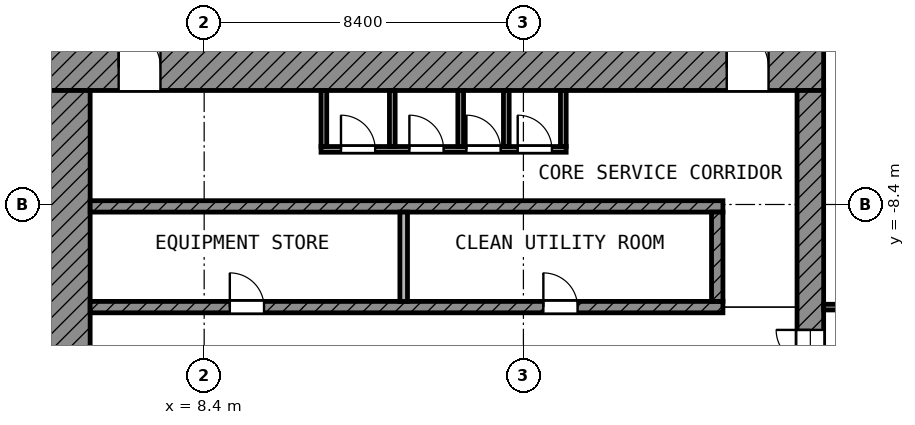
"""IFC4 building model, lengths in metres.
Left out: names, types, materials, properties, quantities, classifications, styles, units other than length and angle.
Written with IfcOpenShell. Run it as: python <this file> out.ifc"""

import sys

from ifc_helpers import new_model, si_unit, direction, frame, frame_2d, origin, place, context, subcontext, project, spatial, rectangle, extrude, element, fill, save


model = new_model("IFC4")
c1 = context("Model", 3, precision=1e-05, world=origin(), true_north=direction((0.0, 1.0)))
c2 = subcontext(c1, "Body", "Model", "MODEL_VIEW")
j1 = project(units=[si_unit("LENGTHUNIT", "METRE"), si_unit("PLANEANGLEUNIT", "RADIAN")], contexts=[c1])
p1 = place(None, origin())
s1 = spatial("IfcSite", under=j1, at=p1, CompositionType="ELEMENT")
p2 = place(p1, origin())
s2 = spatial("IfcBuilding", under=s1, at=p2, CompositionType="ELEMENT")
p3 = place(p2, frame((0.0, 0.0, 286.0)))
s3 = spatial("IfcBuildingStorey", under=s2, at=p3, CompositionType="ELEMENT", Elevation=286.0)
p4 = place(p3, frame((4.2, -4.8, 0.0), z_axis=(0.0, 0.0, 1.0), x_axis=(1.0, 0.0, 0.0)))
e1 = element("IfcWall", 1, at=p4, inside=s3, PredefinedType="SHEAR", context=c2, shape_type="SweptSolid", body=[
    extrude(rectangle(XDim=20.5, YDim=1.2, at=frame_2d((10.25, 0.0))), origin(), (0.0, 0.0, 1.0), 3.6),
])
p5 = place(p4, frame((1.95, 0.0, 0.0)))
e2 = element("IfcOpeningElement", 2, at=p5, cuts=e1, PredefinedType="OPENING", context=c2, shape_type="SweptSolid", body=[
    extrude(rectangle(XDim=1.1, YDim=2.1, at=frame_2d((0.55, 1.05))), frame((0.0, 0.61, 0.0), z_axis=(0.0, -1.0, 0.0), x_axis=(1.0, 0.0, 0.0)), (0.0, 0.0, 1.0), 1.22),
])
p6 = place(p4, frame((17.95, 0.0, 0.0)))
e3 = element("IfcOpeningElement", 3, at=p6, cuts=e1, PredefinedType="OPENING", context=c2, shape_type="SweptSolid", body=[
    extrude(rectangle(XDim=1.1, YDim=2.1, at=frame_2d((0.55, 1.05))), frame((0.0, 0.61, 0.0), z_axis=(0.0, -1.0, 0.0), x_axis=(1.0, 0.0, 0.0)), (0.0, 0.0, 1.0), 1.22),
])
p7 = place(p3, frame((4.8, -24.7, 0.0), z_axis=(0.0, 0.0, 1.0), x_axis=(0.0, 1.0, 0.0)))
e4 = element("IfcWall", 4, at=p7, inside=s3, PredefinedType="SHEAR", context=c2, shape_type="SweptSolid", body=[
    extrude(rectangle(XDim=19.3, YDim=1.2, at=frame_2d((9.65, 0.0))), origin(), (0.0, 0.0, 1.0), 3.6),
])
p8 = place(p7, frame((11.15, 0.0, 0.0)))
e5 = element("IfcOpeningElement", 5, at=p8, cuts=e4, PredefinedType="OPENING", context=c2, shape_type="SweptSolid", body=[
    extrude(rectangle(XDim=1.1, YDim=2.1, at=frame_2d((0.55, 1.05))), frame((0.0, 0.61, 0.0), z_axis=(0.0, -1.0, 0.0), x_axis=(1.0, 0.0, 0.0)), (0.0, 0.0, 1.0), 1.22),
])
p9 = place(p7, frame((1.85, 0.0, 0.0)))
e6 = element("IfcOpeningElement", 6, at=p9, cuts=e4, PredefinedType="OPENING", context=c2, shape_type="SweptSolid", body=[
    extrude(rectangle(XDim=1.1, YDim=2.1, at=frame_2d((0.55, 1.05))), frame((0.0, 0.61, 0.0), z_axis=(0.0, -1.0, 0.0), x_axis=(1.0, 0.0, 0.0)), (0.0, 0.0, 1.0), 1.22),
])
p10 = place(p3, frame((24.35, -24.0, 0.0), z_axis=(0.0, 0.0, 1.0), x_axis=(0.0, 1.0, 0.0)))
e7 = element("IfcWall", 7, at=p10, inside=s3, PredefinedType="SHEAR", context=c2, shape_type="SweptSolid", body=[
    extrude(rectangle(XDim=18.6, YDim=0.7, at=frame_2d((9.3, 0.0))), origin(), (0.0, 0.0, 1.0), 3.6),
])
p11 = place(p10, frame((10.5, 0.0, 0.0)))
e8 = element("IfcOpeningElement", 8, at=p11, cuts=e7, PredefinedType="OPENING", context=c2, shape_type="SweptSolid", body=[
    extrude(rectangle(XDim=1.8, YDim=2.1, at=frame_2d((0.9, 1.05))), frame((0.0, 0.36, 0.0), z_axis=(0.0, -1.0, 0.0), x_axis=(1.0, 0.0, 0.0)), (0.0, 0.0, 1.0), 0.72),
])
p12 = place(p3, frame((5.4, -8.45, 0.0), z_axis=(0.0, 0.0, 1.0), x_axis=(1.0, 0.0, 0.0)))
e9 = element("IfcWall", 9, at=p12, inside=s3, PredefinedType="SHEAR", context=c2, shape_type="SweptSolid", body=[
    extrude(rectangle(XDim=16.65, YDim=0.3, at=frame_2d((8.325, 0.0))), origin(), (0.0, 0.0, 1.0), 3.6),
])
p13 = place(p3, frame((5.4, -11.1, 0.0), z_axis=(0.0, 0.0, 1.0), x_axis=(1.0, 0.0, 0.0)))
e10 = element("IfcWall", 10, at=p13, inside=s3, PredefinedType="SHEAR", context=c2, shape_type="SweptSolid", body=[
    extrude(rectangle(XDim=16.65, YDim=0.3, at=frame_2d((8.325, 0.0))), origin(), (0.0, 0.0, 1.0), 3.6),
])
p14 = place(p13, frame((3.675, 0.0, 0.0)))
e11 = element("IfcOpeningElement", 11, at=p14, cuts=e10, PredefinedType="OPENING", context=c2, shape_type="SweptSolid", body=[
    extrude(rectangle(XDim=0.9, YDim=2.1, at=frame_2d((0.45, 1.05))), frame((0.0, 0.16, 0.0), z_axis=(0.0, -1.0, 0.0), x_axis=(1.0, 0.0, 0.0)), (0.0, 0.0, 1.0), 0.32),
])
p15 = place(p13, frame((11.925, 0.0, 0.0)))
e12 = element("IfcOpeningElement", 12, at=p15, cuts=e10, PredefinedType="OPENING", context=c2, shape_type="SweptSolid", body=[
    extrude(rectangle(XDim=0.9, YDim=2.1, at=frame_2d((0.45, 1.05))), frame((0.0, 0.16, 0.0), z_axis=(0.0, -1.0, 0.0), x_axis=(1.0, 0.0, 0.0)), (0.0, 0.0, 1.0), 0.32),
])
p16 = place(p3, frame((21.9, -10.95, 0.0), z_axis=(0.0, 0.0, 1.0), x_axis=(0.0, 1.0, 0.0)))
e13 = element("IfcWall", 13, at=p16, inside=s3, PredefinedType="SHEAR", context=c2, shape_type="SweptSolid", body=[
    extrude(rectangle(XDim=2.35, YDim=0.3, at=frame_2d((1.175, 0.0))), origin(), (0.0, 0.0, 1.0), 3.6),
])
p17 = place(p3, frame((13.65, -10.95, 0.0), z_axis=(0.0, 0.0, 1.0), x_axis=(0.0, 1.0, 0.0)))
e14 = element("IfcWall", 14, at=p17, inside=s3, PredefinedType="PARTITIONING", context=c2, shape_type="SweptSolid", body=[
    extrude(rectangle(XDim=2.35, YDim=0.2, at=frame_2d((1.175, 0.0))), origin(), (0.0, 0.0, 1.0), 3.6),
])
p18 = place(p3, frame((11.475, -6.95, 0.0), z_axis=(0.0, 0.0, 1.0), x_axis=(1.0, 0.0, 0.0)))
e15 = element("IfcWall", 15, at=p18, inside=s3, PredefinedType="PARTITIONING", context=c2, shape_type="SweptSolid", body=[
    extrude(rectangle(XDim=6.45, YDim=0.15, at=frame_2d((3.225, 0.0))), origin(), (0.0, 0.0, 1.0), 3.6),
])
p19 = place(p18, frame((0.525, 0.0, 0.0)))
e16 = element("IfcOpeningElement", 16, at=p19, cuts=e15, PredefinedType="OPENING", context=c2, shape_type="SweptSolid", body=[
    extrude(rectangle(XDim=0.9, YDim=2.1, at=frame_2d((0.45, 1.05))), frame((0.0, 0.085, 0.0), z_axis=(0.0, -1.0, 0.0), x_axis=(1.0, 0.0, 0.0)), (0.0, 0.0, 1.0), 0.17),
])
p20 = place(p18, frame((2.325, 0.0, 0.0)))
e17 = element("IfcOpeningElement", 17, at=p20, cuts=e15, PredefinedType="OPENING", context=c2, shape_type="SweptSolid", body=[
    extrude(rectangle(XDim=0.9, YDim=2.1, at=frame_2d((0.45, 1.05))), frame((0.0, 0.085, 0.0), z_axis=(0.0, -1.0, 0.0), x_axis=(1.0, 0.0, 0.0)), (0.0, 0.0, 1.0), 0.17),
])
p21 = place(p18, frame((3.825, 0.0, 0.0)))
e18 = element("IfcOpeningElement", 18, at=p21, cuts=e15, PredefinedType="OPENING", context=c2, shape_type="SweptSolid", body=[
    extrude(rectangle(XDim=0.9, YDim=2.1, at=frame_2d((0.45, 1.05))), frame((0.0, 0.085, 0.0), z_axis=(0.0, -1.0, 0.0), x_axis=(1.0, 0.0, 0.0)), (0.0, 0.0, 1.0), 0.17),
])
p22 = place(p18, frame((5.175, 0.0, 0.0)))
e19 = element("IfcOpeningElement", 19, at=p22, cuts=e15, PredefinedType="OPENING", context=c2, shape_type="SweptSolid", body=[
    extrude(rectangle(XDim=0.9, YDim=2.1, at=frame_2d((0.45, 1.05))), frame((0.0, 0.085, 0.0), z_axis=(0.0, -1.0, 0.0), x_axis=(1.0, 0.0, 0.0)), (0.0, 0.0, 1.0), 0.17),
])
for number, where, z_axis, x_axis in (
    (20, (11.55, -6.875, 0.0), (0.0, 0.0, 1.0), (0.0, 1.0, 0.0)),
    (21, (13.35, -6.875, 0.0), (0.0, 0.0, 1.0), (0.0, 1.0, 0.0)),
    (22, (15.15, -6.875, 0.0), (0.0, 0.0, 1.0), (0.0, 1.0, 0.0)),
    (23, (16.35, -6.875, 0.0), (0.0, 0.0, 1.0), (0.0, 1.0, 0.0)),
    (24, (17.85, -6.875, 0.0), (0.0, 0.0, 1.0), (0.0, 1.0, 0.0)),
):
    element("IfcWall", number, at=place(p3, frame(where, z_axis=z_axis, x_axis=x_axis)), inside=s3, PredefinedType="PARTITIONING", context=c2, shape_type="SweptSolid", body=[
        extrude(rectangle(XDim=1.475, YDim=0.15, at=frame_2d((0.738, 0.0))), origin(), (0.0, 0.0, 1.0), 3.6),
    ])
p23 = place(p3, frame((24.7, -11.1, 0.0), z_axis=(0.0, 0.0, 1.0), x_axis=(1.0, 0.0, 0.0)))
e25 = element("IfcWall", 25, at=p23, inside=s3, PredefinedType="PARTITIONING", context=c2, shape_type="SweptSolid", body=[
    extrude(rectangle(XDim=4.625, YDim=0.15, at=frame_2d((2.312, 0.0))), origin(), (0.0, 0.0, 1.0), 3.6),
])
p24 = place(p23, frame((1.1, 0.0, 0.0)))
e26 = element("IfcOpeningElement", 26, at=p24, cuts=e25, PredefinedType="OPENING", context=c2, shape_type="SweptSolid", body=[
    extrude(rectangle(XDim=0.9, YDim=2.1, at=frame_2d((0.45, 1.05))), frame((0.0, 0.085, 0.0), z_axis=(0.0, -1.0, 0.0), x_axis=(1.0, 0.0, 0.0)), (0.0, 0.0, 1.0), 0.17),
])
p25 = place(p23, frame((3.15, 0.0, 0.0)))
e27 = element("IfcOpeningElement", 27, at=p25, cuts=e25, PredefinedType="OPENING", context=c2, shape_type="SweptSolid", body=[
    extrude(rectangle(XDim=1.0, YDim=2.1, at=frame_2d((0.5, 1.05))), frame((0.0, 0.085, 0.0), z_axis=(0.0, -1.0, 0.0), x_axis=(1.0, 0.0, 0.0)), (0.0, 0.0, 1.0), 0.17),
])
p26 = place(p5, origin())
e28 = element("IfcDoor", 28, at=p26, inside=s3, OperationType="SINGLE_SWING_LEFT", PredefinedType="DOOR", context=c2, shape_type="SweptSolid", body=[
    extrude(rectangle(XDim=1.1, YDim=2.1, at=frame_2d((0.55, 1.05))), frame((0.0, 0.025, 0.0), z_axis=(0.0, -1.0, 0.0), x_axis=(1.0, 0.0, 0.0)), (0.0, 0.0, 1.0), 0.05),
])
fill(e2, e28)
p27 = place(p6, origin())
e29 = element("IfcDoor", 29, at=p27, inside=s3, OperationType="SINGLE_SWING_LEFT", PredefinedType="DOOR", context=c2, shape_type="SweptSolid", body=[
    extrude(rectangle(XDim=1.1, YDim=2.1, at=frame_2d((0.55, 1.05))), frame((0.0, 0.025, 0.0), z_axis=(0.0, -1.0, 0.0), x_axis=(1.0, 0.0, 0.0)), (0.0, 0.0, 1.0), 0.05),
])
fill(e3, e29)
p28 = place(p11, origin())
e30 = element("IfcDoor", 30, at=p28, inside=s3, OperationType="DOUBLE_DOOR_SINGLE_SWING", PredefinedType="DOOR", context=c2, shape_type="SweptSolid", body=[
    extrude(rectangle(XDim=1.8, YDim=2.1, at=frame_2d((0.9, 1.05))), frame((0.0, 0.025, 0.0), z_axis=(0.0, -1.0, 0.0), x_axis=(1.0, 0.0, 0.0)), (0.0, 0.0, 1.0), 0.05),
])
fill(e8, e30)
p29 = place(p19, origin())
e31 = element("IfcDoor", 31, at=p29, inside=s3, OperationType="SINGLE_SWING_LEFT", PredefinedType="DOOR", context=c2, shape_type="SweptSolid", body=[
    extrude(rectangle(XDim=0.9, YDim=2.1, at=frame_2d((0.45, 1.05))), frame((0.0, 0.025, 0.0), z_axis=(0.0, -1.0, 0.0), x_axis=(1.0, 0.0, 0.0)), (0.0, 0.0, 1.0), 0.05),
])
fill(e16, e31)
p30 = place(p20, origin())
e32 = element("IfcDoor", 32, at=p30, inside=s3, OperationType="SINGLE_SWING_LEFT", PredefinedType="DOOR", context=c2, shape_type="SweptSolid", body=[
    extrude(rectangle(XDim=0.9, YDim=2.1, at=frame_2d((0.45, 1.05))), frame((0.0, 0.025, 0.0), z_axis=(0.0, -1.0, 0.0), x_axis=(1.0, 0.0, 0.0)), (0.0, 0.0, 1.0), 0.05),
])
fill(e17, e32)
p31 = place(p21, origin())
e33 = element("IfcDoor", 33, at=p31, inside=s3, OperationType="SINGLE_SWING_LEFT", PredefinedType="DOOR", context=c2, shape_type="SweptSolid", body=[
    extrude(rectangle(XDim=0.9, YDim=2.1, at=frame_2d((0.45, 1.05))), frame((0.0, 0.025, 0.0), z_axis=(0.0, -1.0, 0.0), x_axis=(1.0, 0.0, 0.0)), (0.0, 0.0, 1.0), 0.05),
])
fill(e18, e33)
p32 = place(p22, origin())
e34 = element("IfcDoor", 34, at=p32, inside=s3, OperationType="SINGLE_SWING_LEFT", PredefinedType="DOOR", context=c2, shape_type="SweptSolid", body=[
    extrude(rectangle(XDim=0.9, YDim=2.1, at=frame_2d((0.45, 1.05))), frame((0.0, 0.025, 0.0), z_axis=(0.0, -1.0, 0.0), x_axis=(1.0, 0.0, 0.0)), (0.0, 0.0, 1.0), 0.05),
])
fill(e19, e34)
p33 = place(p14, origin())
e35 = element("IfcDoor", 35, at=p33, inside=s3, OperationType="SINGLE_SWING_LEFT", PredefinedType="DOOR", context=c2, shape_type="SweptSolid", body=[
    extrude(rectangle(XDim=0.9, YDim=2.1, at=frame_2d((0.45, 1.05))), frame((0.0, 0.025, 0.0), z_axis=(0.0, -1.0, 0.0), x_axis=(1.0, 0.0, 0.0)), (0.0, 0.0, 1.0), 0.05),
])
fill(e11, e35)
p34 = place(p15, origin())
e36 = element("IfcDoor", 36, at=p34, inside=s3, OperationType="SINGLE_SWING_LEFT", PredefinedType="DOOR", context=c2, shape_type="SweptSolid", body=[
    extrude(rectangle(XDim=0.9, YDim=2.1, at=frame_2d((0.45, 1.05))), frame((0.0, 0.025, 0.0), z_axis=(0.0, -1.0, 0.0), x_axis=(1.0, 0.0, 0.0)), (0.0, 0.0, 1.0), 0.05),
])
fill(e12, e36)
save(model, sys.argv[1])
